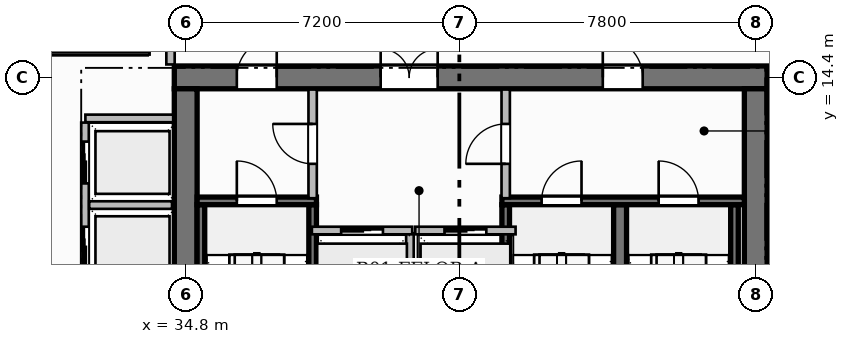
"""IFC4 building model, lengths in metres.
Left out: names, types, materials, properties, quantities, classifications, styles, units other than length and angle.
Written with IfcOpenShell. Run it as: python <this file> out.ifc"""

import sys

from ifc_helpers import new_model, si_unit, direction, frame, frame_2d, origin, place, context, subcontext, project, spatial, rectangle, extrude, source, transform, mapped, element, fill, save


model = new_model("IFC4")
c1 = context("Model", 3, precision=1e-05, world=origin(), true_north=direction((0.0, 1.0)))
c2 = subcontext(c1, "Body", "Model", "MODEL_VIEW")
j1 = project(units=[si_unit("LENGTHUNIT", "METRE"), si_unit("PLANEANGLEUNIT", "RADIAN")], contexts=[c1])
p1 = place(None, origin())
s1 = spatial("IfcSite", under=j1, at=p1, CompositionType="ELEMENT")
p2 = place(p1, origin())
s2 = spatial("IfcBuilding", under=s1, at=p2, CompositionType="ELEMENT")
p3 = place(p2, frame((0.0, 0.0, -6.5)))
s3 = spatial("IfcBuildingStorey", under=s2, at=p3, CompositionType="ELEMENT", Elevation=-6.5)
p4 = place(p3, frame((34.5, 14.4, 0.0), z_axis=(0.0, 0.0, 1.0), x_axis=(1.0, 0.0, 0.0)))
e1 = element("IfcWall", 1, at=p4, inside=s3, PredefinedType="SHEAR", context=c2, shape_type="SweptSolid", body=[
    extrude(rectangle(XDim=15.6, YDim=0.6, at=frame_2d((7.8, 0.0))), origin(), (0.0, 0.0, 1.0), 6.5),
])
p5 = place(p4, frame((5.43, 0.0, 0.0)))
e2 = element("IfcOpeningElement", 2, at=p5, cuts=e1, PredefinedType="OPENING", context=c2, shape_type="SweptSolid", body=[
    extrude(rectangle(XDim=1.5, YDim=2.2, at=frame_2d((0.75, 1.1))), frame((0.0, 0.31, 0.0), z_axis=(0.0, -1.0, 0.0), x_axis=(1.0, 0.0, 0.0)), (0.0, 0.0, 1.0), 0.62),
])
p6 = place(p4, frame((1.645, 0.0, 0.0)))
e3 = element("IfcOpeningElement", 3, at=p6, cuts=e1, PredefinedType="OPENING", context=c2, shape_type="SweptSolid", body=[
    extrude(rectangle(XDim=1.05, YDim=2.15, at=frame_2d((0.525, 1.075))), frame((0.0, 0.31, 0.0), z_axis=(0.0, -1.0, 0.0), x_axis=(1.0, 0.0, 0.0)), (0.0, 0.0, 1.0), 0.62),
])
p7 = place(p4, frame((11.275, 0.0, 0.0)))
e4 = element("IfcOpeningElement", 4, at=p7, cuts=e1, PredefinedType="OPENING", context=c2, shape_type="SweptSolid", body=[
    extrude(rectangle(XDim=1.05, YDim=2.15, at=frame_2d((0.525, 1.075))), frame((0.0, 0.31, 0.0), z_axis=(0.0, -1.0, 0.0), x_axis=(1.0, 0.0, 0.0)), (0.0, 0.0, 1.0), 0.62),
])
for number, where, z_axis, x_axis in (
    (5, (34.8, 3.9, 0.0), (0.0, 0.0, 1.0), (0.0, 1.0, 0.0)),
    (6, (49.8, 3.9, 0.0), (0.0, 0.0, 1.0), (0.0, 1.0, 0.0)),
):
    element("IfcWall", number, at=place(p3, frame(where, z_axis=z_axis, x_axis=x_axis)), inside=s3, PredefinedType="SHEAR", context=c2, shape_type="SweptSolid", body=[
        extrude(rectangle(XDim=10.2, YDim=0.6, at=frame_2d((5.1, 0.0))), origin(), (0.0, 0.0, 1.0), 6.5),
    ])
for number, where, z_axis, x_axis in (
    (7, (35.2, 4.1, 0.0), (0.0, 0.0, 1.0), (0.0, 1.0, 0.0)),
    (8, (38.14, 4.1, 0.0), (0.0, 0.0, 1.0), (0.0, 1.0, 0.0)),
):
    element("IfcWall", number, at=place(p3, frame(where, z_axis=z_axis, x_axis=x_axis)), inside=s3, PredefinedType="SHEAR", context=c2, shape_type="SweptSolid", body=[
        extrude(rectangle(XDim=6.95, YDim=0.2, at=frame_2d((3.475, 0.0))), origin(), (0.0, 0.0, 1.0), 6.5),
    ])
p8 = place(p3, frame((35.1, 11.15, 0.0), z_axis=(0.0, 0.0, 1.0), x_axis=(1.0, 0.0, 0.0)))
e9 = element("IfcWall", 9, at=p8, inside=s3, PredefinedType="SHEAR", context=c2, shape_type="SweptSolid", body=[
    extrude(rectangle(XDim=3.14, YDim=0.2, at=frame_2d((1.57, 0.0))), origin(), (0.0, 0.0, 1.0), 6.5),
])
p9 = place(p8, frame((1.045, 0.0, 0.0)))
e10 = element("IfcOpeningElement", 10, at=p9, cuts=e9, PredefinedType="OPENING", context=c2, shape_type="SweptSolid", body=[
    extrude(rectangle(XDim=1.05, YDim=2.2, at=frame_2d((0.525, 1.1))), frame((0.0, 0.11, 0.0), z_axis=(0.0, -1.0, 0.0), x_axis=(1.0, 0.0, 0.0)), (0.0, 0.0, 1.0), 0.22),
])
p10 = place(p3, frame((43.22, 4.1, 0.0), z_axis=(0.0, 0.0, 1.0), x_axis=(0.0, 1.0, 0.0)))
e11 = element("IfcWall", 11, at=p10, inside=s3, PredefinedType="SHEAR", context=c2, shape_type="SweptSolid", body=[
    extrude(rectangle(XDim=6.95, YDim=0.2, at=frame_2d((3.475, 0.0))), origin(), (0.0, 0.0, 1.0), 6.5),
])
p11 = place(p3, frame((46.23, 4.1, 0.0), z_axis=(0.0, 0.0, 1.0), x_axis=(0.0, 1.0, 0.0)))
e12 = element("IfcWall", 12, at=p11, inside=s3, PredefinedType="SHEAR", context=c2, shape_type="SweptSolid", body=[
    extrude(rectangle(XDim=6.95, YDim=0.34, at=frame_2d((3.475, 0.0))), origin(), (0.0, 0.0, 1.0), 6.5),
])
p12 = place(p3, frame((49.24, 4.1, 0.0), z_axis=(0.0, 0.0, 1.0), x_axis=(0.0, 1.0, 0.0)))
e13 = element("IfcWall", 13, at=p12, inside=s3, PredefinedType="SHEAR", context=c2, shape_type="SweptSolid", body=[
    extrude(rectangle(XDim=6.95, YDim=0.2, at=frame_2d((3.475, 0.0))), origin(), (0.0, 0.0, 1.0), 6.5),
])
p13 = place(p3, frame((43.12, 11.15, 0.0), z_axis=(0.0, 0.0, 1.0), x_axis=(1.0, 0.0, 0.0)))
e14 = element("IfcWall", 14, at=p13, inside=s3, PredefinedType="SHEAR", context=c2, shape_type="SweptSolid", body=[
    extrude(rectangle(XDim=6.38, YDim=0.2, at=frame_2d((3.19, 0.0))), origin(), (0.0, 0.0, 1.0), 6.5),
])
p14 = place(p13, frame((1.045, 0.0, 0.0)))
e15 = element("IfcOpeningElement", 15, at=p14, cuts=e14, PredefinedType="OPENING", context=c2, shape_type="SweptSolid", body=[
    extrude(rectangle(XDim=1.05, YDim=2.2, at=frame_2d((0.525, 1.1))), frame((0.0, 0.11, 0.0), z_axis=(0.0, -1.0, 0.0), x_axis=(1.0, 0.0, 0.0)), (0.0, 0.0, 1.0), 0.22),
])
p15 = place(p13, frame((4.125, 0.0, 0.0)))
e16 = element("IfcOpeningElement", 16, at=p15, cuts=e14, PredefinedType="OPENING", context=c2, shape_type="SweptSolid", body=[
    extrude(rectangle(XDim=1.05, YDim=2.2, at=frame_2d((0.525, 1.1))), frame((0.0, 0.11, 0.0), z_axis=(0.0, -1.0, 0.0), x_axis=(1.0, 0.0, 0.0)), (0.0, 0.0, 1.0), 0.22),
])
p16 = place(p3, frame((40.7, 8.12, 0.0), z_axis=(0.0, 0.0, 1.0), x_axis=(0.0, 1.0, 0.0)))
e17 = element("IfcWall", 17, at=p16, inside=s3, PredefinedType="PARTITIONING", context=c2, shape_type="SweptSolid", body=[
    extrude(rectangle(XDim=2.18, YDim=0.2, at=frame_2d((1.09, 0.0))), origin(), (0.0, 0.0, 1.0), 6.1),
])
p17 = place(p3, frame((38.14, 11.22, 0.0), z_axis=(0.0, 0.0, 1.0), x_axis=(0.0, 1.0, 0.0)))
e18 = element("IfcWall", 18, at=p17, inside=s3, PredefinedType="PARTITIONING", context=c2, shape_type="SweptSolid", body=[
    extrude(rectangle(XDim=2.86, YDim=0.22, at=frame_2d((1.43, 0.0))), origin(), (0.0, 0.0, 1.0), 6.1),
])
p18 = place(p17, frame((0.905, 0.0, 0.0)))
e19 = element("IfcOpeningElement", 19, at=p18, cuts=e18, PredefinedType="OPENING", context=c2, shape_type="SweptSolid", body=[
    extrude(rectangle(XDim=1.05, YDim=2.15, at=frame_2d((0.525, 1.075))), frame((0.0, 0.12, 0.0), z_axis=(0.0, -1.0, 0.0), x_axis=(1.0, 0.0, 0.0)), (0.0, 0.0, 1.0), 0.24),
])
p19 = place(p3, frame((43.22, 11.22, 0.0), z_axis=(0.0, 0.0, 1.0), x_axis=(0.0, 1.0, 0.0)))
e20 = element("IfcWall", 20, at=p19, inside=s3, PredefinedType="PARTITIONING", context=c2, shape_type="SweptSolid", body=[
    extrude(rectangle(XDim=2.86, YDim=0.22, at=frame_2d((1.43, 0.0))), origin(), (0.0, 0.0, 1.0), 6.1),
])
p20 = place(p19, frame((0.905, 0.0, 0.0)))
e21 = element("IfcOpeningElement", 21, at=p20, cuts=e20, PredefinedType="OPENING", context=c2, shape_type="SweptSolid", body=[
    extrude(rectangle(XDim=1.05, YDim=2.15, at=frame_2d((0.525, 1.075))), frame((0.0, 0.12, 0.0), z_axis=(0.0, -1.0, 0.0), x_axis=(1.0, 0.0, 0.0)), (0.0, 0.0, 1.0), 0.24),
])
p21 = place(p3, frame((32.16, 13.32, 0.0), z_axis=(0.0, 0.0, 1.0), x_axis=(1.0, 0.0, 0.0)))
e22 = element("IfcWall", 22, at=p21, inside=s3, PredefinedType="PARTITIONING", context=c2, shape_type="SweptSolid", body=[
    extrude(rectangle(XDim=2.31, YDim=0.2, at=frame_2d((1.155, 0.0))), origin(), (0.0, 0.0, 1.0), 6.1),
])
p22 = place(p3, frame((32.15, 4.39, 0.0), z_axis=(0.0, 0.0, 1.0), x_axis=(0.0, 1.0, 0.0)))
e23 = element("IfcWall", 23, at=p22, inside=s3, PredefinedType="PARTITIONING", context=c2, shape_type="SweptSolid", body=[
    extrude(rectangle(XDim=8.82, YDim=0.2, at=frame_2d((4.41, 0.0))), origin(), (0.0, 0.0, 1.0), 5.335),
])
p23 = place(p22, frame((0.5, 0.0, 0.0)))
e24 = element("IfcOpeningElement", 24, at=p23, cuts=e23, PredefinedType="OPENING", context=c2, shape_type="SweptSolid", body=[
    extrude(rectangle(XDim=1.1, YDim=2.2, at=frame_2d((0.55, 1.1))), frame((0.0, 0.11, 0.0), z_axis=(0.0, -1.0, 0.0), x_axis=(1.0, 0.0, 0.0)), (0.0, 0.0, 1.0), 0.22),
])
p24 = place(p22, frame((2.74, 0.0, 0.0)))
e25 = element("IfcOpeningElement", 25, at=p24, cuts=e23, PredefinedType="OPENING", context=c2, shape_type="SweptSolid", body=[
    extrude(rectangle(XDim=1.1, YDim=2.2, at=frame_2d((0.55, 1.1))), frame((0.0, 0.11, 0.0), z_axis=(0.0, -1.0, 0.0), x_axis=(1.0, 0.0, 0.0)), (0.0, 0.0, 1.0), 0.22),
])
p25 = place(p22, frame((4.98, 0.0, 0.0)))
e26 = element("IfcOpeningElement", 26, at=p25, cuts=e23, PredefinedType="OPENING", context=c2, shape_type="SweptSolid", body=[
    extrude(rectangle(XDim=1.1, YDim=2.2, at=frame_2d((0.55, 1.1))), frame((0.0, 0.11, 0.0), z_axis=(0.0, -1.0, 0.0), x_axis=(1.0, 0.0, 0.0)), (0.0, 0.0, 1.0), 0.22),
])
p26 = place(p22, frame((7.22, 0.0, 0.0)))
e27 = element("IfcOpeningElement", 27, at=p26, cuts=e23, PredefinedType="OPENING", context=c2, shape_type="SweptSolid", body=[
    extrude(rectangle(XDim=1.1, YDim=2.2, at=frame_2d((0.55, 1.1))), frame((0.0, 0.11, 0.0), z_axis=(0.0, -1.0, 0.0), x_axis=(1.0, 0.0, 0.0)), (0.0, 0.0, 1.0), 0.22),
])
p27 = place(p3, frame((32.26, 11.04, 0.0), z_axis=(0.0, 0.0, 1.0), x_axis=(1.0, 0.0, 0.0)))
e28 = element("IfcWall", 28, at=p27, inside=s3, PredefinedType="PARTITIONING", context=c2, shape_type="SweptSolid", body=[
    extrude(rectangle(XDim=2.18, YDim=0.2, at=frame_2d((1.09, 0.0))), origin(), (0.0, 0.0, 1.0), 6.1),
])
p28 = place(p3, frame((34.4, 14.74, 0.0), z_axis=(0.0, 0.0, 1.0), x_axis=(0.0, 1.0, 0.0)))
e29 = element("IfcWall", 29, at=p28, inside=s3, PredefinedType="PARTITIONING", context=c2, shape_type="SweptSolid", body=[
    extrude(rectangle(XDim=6.72, YDim=0.22, at=frame_2d((3.36, 0.0))), origin(), (0.0, 0.0, 1.0), 5.185),
])
p29 = place(p28, frame((1.35, 0.0, 0.0)))
e30 = element("IfcOpeningElement", 30, at=p29, cuts=e29, PredefinedType="OPENING", context=c2, shape_type="SweptSolid", body=[
    extrude(rectangle(XDim=4.0, YDim=3.2, at=frame_2d((2.0, 1.6))), frame((0.0, 0.12, 0.0), z_axis=(0.0, -1.0, 0.0), x_axis=(1.0, 0.0, 0.0)), (0.0, 0.0, 1.0), 0.24),
])
p30 = place(p3, frame((38.12, 10.37, 0.0), z_axis=(0.0, 0.0, 1.0), x_axis=(1.0, 0.0, 0.0)))
e31 = element("IfcWall", 31, at=p30, inside=s3, PredefinedType="PARTITIONING", context=c2, shape_type="SweptSolid", body=[
    extrude(rectangle(XDim=2.64, YDim=0.2, at=frame_2d((1.32, 0.0))), origin(), (0.0, 0.0, 1.0), 6.1),
])
p31 = place(p30, frame((0.77, 0.0, 0.0)))
e32 = element("IfcOpeningElement", 32, at=p31, cuts=e31, PredefinedType="OPENING", context=c2, shape_type="SweptSolid", body=[
    extrude(rectangle(XDim=1.1, YDim=2.2, at=frame_2d((0.55, 1.1))), frame((0.0, 0.11, 0.0), z_axis=(0.0, -1.0, 0.0), x_axis=(1.0, 0.0, 0.0)), (0.0, 0.0, 1.0), 0.22),
])
p32 = place(p3, frame((40.84, 10.37, 0.0), z_axis=(0.0, 0.0, 1.0), x_axis=(1.0, 0.0, 0.0)))
e33 = element("IfcWall", 33, at=p32, inside=s3, PredefinedType="PARTITIONING", context=c2, shape_type="SweptSolid", body=[
    extrude(rectangle(XDim=2.64, YDim=0.2, at=frame_2d((1.32, 0.0))), origin(), (0.0, 0.0, 1.0), 6.1),
])
p33 = place(p32, frame((0.77, 0.0, 0.0)))
e34 = element("IfcOpeningElement", 34, at=p33, cuts=e33, PredefinedType="OPENING", context=c2, shape_type="SweptSolid", body=[
    extrude(rectangle(XDim=1.1, YDim=2.2, at=frame_2d((0.55, 1.1))), frame((0.0, 0.11, 0.0), z_axis=(0.0, -1.0, 0.0), x_axis=(1.0, 0.0, 0.0)), (0.0, 0.0, 1.0), 0.22),
])
m1 = source(origin(), c2, "Body", "SweptSolid", [
    extrude(rectangle(XDim=1.05, YDim=2.2, at=frame_2d((0.525, 1.1))), frame((0.0, 0.025, 0.0), z_axis=(0.0, -1.0, 0.0), x_axis=(1.0, 0.0, 0.0)), (0.0, 0.0, 1.0), 0.05),
])
p34 = place(p9, origin())
e35 = element("IfcDoor", 35, at=p34, inside=s3, OperationType="SINGLE_SWING_LEFT", PredefinedType="DOOR", context=c2, shape_type="MappedRepresentation", body=[
    mapped(m1, transform((0.0, 0.0, 0.0), scale=1.0)),
])
fill(e10, e35)
p35 = place(p14, origin())
e36 = element("IfcDoor", 36, at=p35, inside=s3, OperationType="SINGLE_SWING_RIGHT", PredefinedType="DOOR", context=c2, shape_type="MappedRepresentation", body=[
    mapped(m1, transform((0.0, 0.0, 0.0), scale=1.0)),
])
fill(e15, e36)
p36 = place(p15, origin())
e37 = element("IfcDoor", 37, at=p36, inside=s3, OperationType="SINGLE_SWING_LEFT", PredefinedType="DOOR", context=c2, shape_type="MappedRepresentation", body=[
    mapped(m1, transform((0.0, 0.0, 0.0), scale=1.0)),
])
fill(e16, e37)
m2 = source(origin(), c2, "Body", "SweptSolid", [
    extrude(rectangle(XDim=1.05, YDim=2.15, at=frame_2d((0.525, 1.075))), frame((0.0, 0.025, 0.0), z_axis=(0.0, -1.0, 0.0), x_axis=(1.0, 0.0, 0.0)), (0.0, 0.0, 1.0), 0.05),
])
p37 = place(p18, origin())
e38 = element("IfcDoor", 38, at=p37, inside=s3, OperationType="SINGLE_SWING_RIGHT", PredefinedType="DOOR", context=c2, shape_type="MappedRepresentation", body=[
    mapped(m2, transform((0.0, 0.0, 0.0), scale=1.0)),
])
fill(e19, e38)
p38 = place(p20, origin())
e39 = element("IfcDoor", 39, at=p38, inside=s3, OperationType="SINGLE_SWING_LEFT", PredefinedType="DOOR", context=c2, shape_type="MappedRepresentation", body=[
    mapped(m2, transform((0.0, 0.0, 0.0), scale=1.0)),
])
fill(e21, e39)
m3 = source(origin(), c2, "Body", "SweptSolid", [
    extrude(rectangle(XDim=1.5, YDim=2.2, at=frame_2d((0.75, 1.1))), frame((0.0, 0.025, 0.0), z_axis=(0.0, -1.0, 0.0), x_axis=(1.0, 0.0, 0.0)), (0.0, 0.0, 1.0), 0.05),
])
p39 = place(p5, origin())
e40 = element("IfcDoor", 40, at=p39, inside=s3, OperationType="DOUBLE_DOOR_SINGLE_SWING", PredefinedType="DOOR", context=c2, shape_type="MappedRepresentation", body=[
    mapped(m3, transform((0.0, 0.0, 0.0), scale=1.0)),
])
fill(e2, e40)
p40 = place(p6, origin())
e41 = element("IfcDoor", 41, at=p40, inside=s3, OperationType="SINGLE_SWING_RIGHT", PredefinedType="DOOR", context=c2, shape_type="MappedRepresentation", body=[
    mapped(m2, transform((0.0, 0.0, 0.0), scale=1.0)),
])
fill(e3, e41)
p41 = place(p7, origin())
e42 = element("IfcDoor", 42, at=p41, inside=s3, OperationType="SINGLE_SWING_LEFT", PredefinedType="DOOR", context=c2, shape_type="MappedRepresentation", body=[
    mapped(m2, transform((0.0, 0.0, 0.0), scale=1.0)),
])
fill(e4, e42)
m4 = source(origin(), c2, "Body", "SweptSolid", [
    extrude(rectangle(XDim=1.1, YDim=2.2, at=frame_2d((0.55, 1.1))), frame((0.0, 0.025, 0.0), z_axis=(0.0, -1.0, 0.0), x_axis=(1.0, 0.0, 0.0)), (0.0, 0.0, 1.0), 0.05),
])
p42 = place(p31, origin())
e43 = element("IfcDoor", 43, at=p42, inside=s3, OperationType="SLIDING_TO_LEFT", PredefinedType="DOOR", context=c2, shape_type="MappedRepresentation", body=[
    mapped(m4, transform((0.0, 0.0, 0.0), scale=1.0)),
])
fill(e32, e43)
p43 = place(p33, origin())
e44 = element("IfcDoor", 44, at=p43, inside=s3, OperationType="SLIDING_TO_LEFT", PredefinedType="DOOR", context=c2, shape_type="MappedRepresentation", body=[
    mapped(m4, transform((0.0, 0.0, 0.0), scale=1.0)),
])
fill(e34, e44)
p44 = place(p25, origin())
e45 = element("IfcDoor", 45, at=p44, inside=s3, OperationType="SLIDING_TO_LEFT", PredefinedType="DOOR", context=c2, shape_type="MappedRepresentation", body=[
    mapped(m4, transform((0.0, 0.0, 0.0), scale=1.0)),
])
fill(e26, e45)
p45 = place(p26, origin())
e46 = element("IfcDoor", 46, at=p45, inside=s3, OperationType="SLIDING_TO_LEFT", PredefinedType="DOOR", context=c2, shape_type="MappedRepresentation", body=[
    mapped(m4, transform((0.0, 0.0, 0.0), scale=1.0)),
])
fill(e27, e46)
save(model, sys.argv[1])
